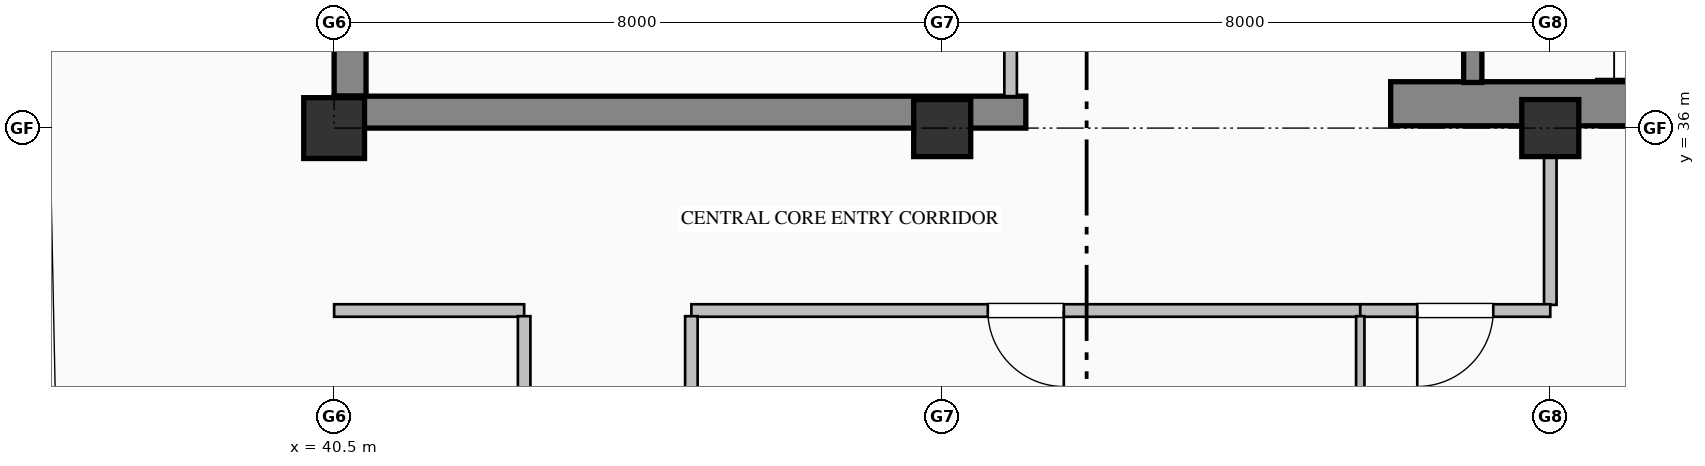
"""IFC4 building model, lengths in metres.
Left out: names, types, materials, properties, quantities, classifications, styles, units other than length and angle.
Written with IfcOpenShell. Run it as: python <this file> out.ifc"""

import sys

from ifc_helpers import new_model, si_unit, direction, frame, frame_2d, origin, origin_2d, place, context, subcontext, project, spatial, rectangle, hollow_rectangle, extrude, element, fill, save


model = new_model("IFC4")
c1 = context("Model", 3, precision=1e-05, world=origin(), true_north=direction((0.0, 1.0)))
c2 = subcontext(c1, "Body", "Model", "MODEL_VIEW")
j1 = project(units=[si_unit("LENGTHUNIT", "METRE"), si_unit("PLANEANGLEUNIT", "RADIAN")], contexts=[c1])
p1 = place(None, origin())
s1 = spatial("IfcSite", under=j1, at=p1, CompositionType="ELEMENT")
p2 = place(p1, origin())
s2 = spatial("IfcBuilding", under=s1, at=p2, CompositionType="ELEMENT")
p3 = place(p2, frame((0.0, 0.0, 343.2)))
s3 = spatial("IfcBuildingStorey", under=s2, at=p3, CompositionType="ELEMENT", Elevation=343.2)
p4 = place(p3, frame((40.71, 36.42, 0.0), z_axis=(0.0, 0.0, 1.0), x_axis=(0.0, 1.0, 0.0)))
e1 = element("IfcWall", 1, at=p4, inside=s3, PredefinedType="SHEAR", context=c2, shape_type="SweptSolid", body=[
    extrude(rectangle(XDim=7.98, YDim=0.42, at=frame_2d((3.99, 0.0))), origin(), (0.0, 0.0, 1.0), 3.785),
])
p5 = place(p3, frame((40.5, 36.21, 0.0), z_axis=(0.0, 0.0, 1.0), x_axis=(1.0, 0.0, 0.0)))
e2 = element("IfcWall", 2, at=p5, inside=s3, PredefinedType="SHEAR", context=c2, shape_type="SweptSolid", body=[
    extrude(rectangle(XDim=9.1, YDim=0.42, at=frame_2d((4.55, 0.0))), origin(), (0.0, 0.0, 1.0), 3.785),
])
p6 = place(p3, frame((54.4, 36.32, 0.0), z_axis=(0.0, 0.0, 1.0), x_axis=(1.0, 0.0, 0.0)))
e3 = element("IfcWall", 3, at=p6, inside=s3, PredefinedType="SHEAR", context=c2, shape_type="SweptSolid", body=[
    extrude(rectangle(XDim=9.6, YDim=0.58, at=frame_2d((4.8, 0.0))), origin(), (0.0, 0.0, 1.0), 4.0),
])
p7 = place(p3, frame((40.5, 36.0, 0.0), z_axis=(0.0, 0.0, 1.0), x_axis=(1.0, 0.0, 0.0)))
e4 = element("IfcColumn", 4, at=p7, inside=s3, PredefinedType="COLUMN", context=c2, shape_type="SweptSolid", body=[
    extrude(hollow_rectangle(XDim=0.8, YDim=0.8, WallThickness=0.032, at=origin_2d()), origin(), (0.0, 0.0, 1.0), 4.0),
])
for number, where, z_axis, x_axis in (
    (5, (48.5, 36.0, 0.0), (0.0, 0.0, 1.0), (1.0, 0.0, 0.0)),
    (6, (56.5, 36.0, 0.0), (0.0, 0.0, 1.0), (1.0, 0.0, 0.0)),
):
    element("IfcColumn", number, at=place(p3, frame(where, z_axis=z_axis, x_axis=x_axis)), inside=s3, PredefinedType="COLUMN", context=c2, shape_type="SweptSolid", body=[
        extrude(rectangle(XDim=0.75, YDim=0.75, at=origin_2d()), origin(), (0.0, 0.0, 1.0), 4.0),
    ])
p8 = place(p3, frame((55.48, 39.75, 0.0), z_axis=(0.0, 0.0, 1.0), x_axis=(0.0, -1.0, 0.0)))
e7 = element("IfcWall", 7, at=p8, inside=s3, PredefinedType="SOLIDWALL", context=c2, shape_type="SweptSolid", body=[
    extrude(rectangle(XDim=3.15, YDim=0.24, at=frame_2d((1.575, 0.0))), origin(), (0.0, 0.0, 1.0), 4.0),
])
p9 = place(p8, frame((1.0, 0.0, 0.0)))
e8 = element("IfcOpeningElement", 8, at=p9, cuts=e7, PredefinedType="OPENING", context=c2, shape_type="SweptSolid", body=[
    extrude(rectangle(XDim=1.15, YDim=2.2, at=frame_2d((0.575, 1.1))), frame((0.0, 0.13, 0.0), z_axis=(0.0, -1.0, 0.0), x_axis=(1.0, 0.0, 0.0)), (0.0, 0.0, 1.0), 0.26),
])
p10 = place(p3, frame((49.4, 36.42, 0.0), z_axis=(0.0, 0.0, 1.0), x_axis=(0.0, 1.0, 0.0)))
e9 = element("IfcWall", 9, at=p10, inside=s3, PredefinedType="PARTITIONING", context=c2, shape_type="SweptSolid", body=[
    extrude(rectangle(XDim=3.133, YDim=0.165, at=frame_2d((1.566, 0.0))), origin(), (0.0, 0.0, 1.0), 3.027),
])
p11 = place(p10, frame((1.066, 0.0, 0.0)))
e10 = element("IfcOpeningElement", 10, at=p11, cuts=e9, PredefinedType="OPENING", context=c2, shape_type="SweptSolid", body=[
    extrude(rectangle(XDim=1.0, YDim=2.15, at=frame_2d((0.5, 1.075))), frame((0.0, 0.093, 0.0), z_axis=(0.0, -1.0, 0.0), x_axis=(1.0, 0.0, 0.0)), (0.0, 0.0, 1.0), 0.185),
])
p12 = place(p3, frame((54.0, 33.6, 0.0), z_axis=(0.0, 0.0, 1.0), x_axis=(-1.0, 0.0, 0.0)))
e11 = element("IfcWall", 11, at=p12, inside=s3, PredefinedType="PARTITIONING", context=c2, shape_type="SweptSolid", body=[
    extrude(rectangle(XDim=8.8, YDim=0.165, at=frame_2d((4.4, 0.0))), origin(), (0.0, 0.0, 1.0), 3.785),
])
p13 = place(p12, frame((3.9, 0.0, 0.0)))
e12 = element("IfcOpeningElement", 12, at=p13, cuts=e11, PredefinedType="OPENING", context=c2, shape_type="SweptSolid", body=[
    extrude(rectangle(XDim=1.0, YDim=2.15, at=frame_2d((0.5, 1.075))), frame((0.0, 0.093, 0.0), z_axis=(0.0, -1.0, 0.0), x_axis=(1.0, 0.0, 0.0)), (0.0, 0.0, 1.0), 0.185),
])
p14 = place(p3, frame((56.5, 36.0, 0.0), z_axis=(0.0, 0.0, 1.0), x_axis=(0.0, -1.0, 0.0)))
e13 = element("IfcWall", 13, at=p14, inside=s3, PredefinedType="PARTITIONING", context=c2, shape_type="SweptSolid", body=[
    extrude(rectangle(XDim=2.325, YDim=0.165, at=frame_2d((1.163, 0.0))), origin(), (0.0, 0.0, 1.0), 3.177),
])
p15 = place(p3, frame((56.5, 33.6, 0.0), z_axis=(0.0, 0.0, 1.0), x_axis=(-1.0, 0.0, 0.0)))
e14 = element("IfcWall", 14, at=p15, inside=s3, PredefinedType="PARTITIONING", context=c2, shape_type="SweptSolid", body=[
    extrude(rectangle(XDim=2.5, YDim=0.165, at=frame_2d((1.25, 0.0))), origin(), (0.0, 0.0, 1.0), 3.785),
])
p16 = place(p15, frame((0.75, 0.0, 0.0)))
e15 = element("IfcOpeningElement", 15, at=p16, cuts=e14, PredefinedType="OPENING", context=c2, shape_type="SweptSolid", body=[
    extrude(rectangle(XDim=1.0, YDim=2.15, at=frame_2d((0.5, 1.075))), frame((0.0, 0.093, 0.0), z_axis=(0.0, -1.0, 0.0), x_axis=(1.0, 0.0, 0.0)), (0.0, 0.0, 1.0), 0.185),
])
p17 = place(p3, frame((43.0, 33.6, 0.0), z_axis=(0.0, 0.0, 1.0), x_axis=(-1.0, 0.0, 0.0)))
e16 = element("IfcWall", 16, at=p17, inside=s3, PredefinedType="PARTITIONING", context=c2, shape_type="SweptSolid", body=[
    extrude(rectangle(XDim=2.5, YDim=0.165, at=frame_2d((1.25, 0.0))), origin(), (0.0, 0.0, 1.0), 3.785),
])
p18 = place(p3, frame((45.2, 33.525, 0.0), z_axis=(0.0, 0.0, 1.0), x_axis=(0.0, -1.0, 0.0)))
e17 = element("IfcWall", 17, at=p18, inside=s3, PredefinedType="PARTITIONING", context=c2, shape_type="SweptSolid", body=[
    extrude(rectangle(XDim=2.978, YDim=0.165, at=frame_2d((1.489, 0.0))), origin(), (0.0, 0.0, 1.0), 3.785),
])
p19 = place(p3, frame((43.0, 22.875, 0.0), z_axis=(0.0, 0.0, 1.0), x_axis=(0.0, 1.0, 0.0)))
e18 = element("IfcWall", 18, at=p19, inside=s3, PredefinedType="PARTITIONING", context=c2, shape_type="SweptSolid", body=[
    extrude(rectangle(XDim=10.651, YDim=0.165, at=frame_2d((5.325, 0.0))), origin(), (0.0, 0.0, 1.0), 3.785),
])
p20 = place(p19, frame((4.875, 0.0, 0.0)))
e19 = element("IfcOpeningElement", 19, at=p20, cuts=e18, PredefinedType="OPENING", context=c2, shape_type="SweptSolid", body=[
    extrude(rectangle(XDim=0.9, YDim=2.15, at=frame_2d((0.45, 1.075))), frame((0.0, 0.093, 0.0), z_axis=(0.0, -1.0, 0.0), x_axis=(1.0, 0.0, 0.0)), (0.0, 0.0, 1.0), 0.185),
])
p21 = place(p3, frame((54.0, 33.525, 0.0), z_axis=(0.0, 0.0, 1.0), x_axis=(0.0, -1.0, 0.0)))
e20 = element("IfcWall", 20, at=p21, inside=s3, PredefinedType="MOVABLE", context=c2, shape_type="SweptSolid", body=[
    extrude(rectangle(XDim=2.978, YDim=0.11, at=frame_2d((1.489, 0.0))), origin(), (0.0, 0.0, 1.0), 3.785),
])
p22 = place(p13, origin())
e21 = element("IfcDoor", 21, at=p22, inside=s3, OperationType="SINGLE_SWING_LEFT", PredefinedType="DOOR", context=c2, shape_type="SweptSolid", body=[
    extrude(rectangle(XDim=1.0, YDim=2.15, at=frame_2d((0.5, 1.075))), frame((0.0, 0.025, 0.0), z_axis=(0.0, -1.0, 0.0), x_axis=(1.0, 0.0, 0.0)), (0.0, 0.0, 1.0), 0.05),
])
fill(e12, e21)
p23 = place(p16, origin())
e22 = element("IfcDoor", 22, at=p23, inside=s3, OperationType="SINGLE_SWING_RIGHT", PredefinedType="DOOR", context=c2, shape_type="SweptSolid", body=[
    extrude(rectangle(XDim=1.0, YDim=2.15, at=frame_2d((0.5, 1.075))), frame((0.0, 0.025, 0.0), z_axis=(0.0, -1.0, 0.0), x_axis=(1.0, 0.0, 0.0)), (0.0, 0.0, 1.0), 0.05),
])
fill(e15, e22)
save(model, sys.argv[1])
